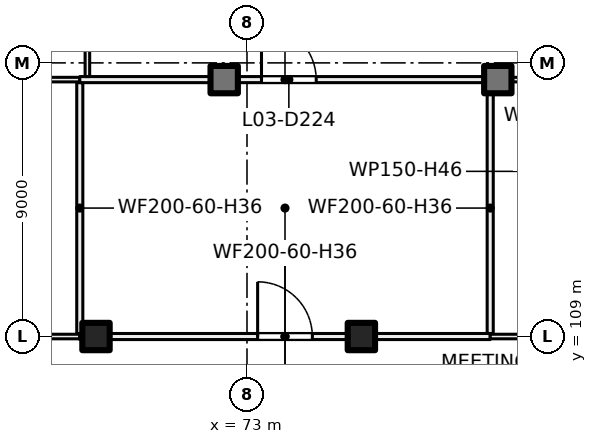
"""IFC4 building model, lengths in metres.
Left out: names, types, materials, properties, quantities, classifications, styles, units other than length and angle.
Written with IfcOpenShell. Run it as: python <this file> out.ifc"""

import sys

from ifc_helpers import new_model, si_unit, direction, frame, frame_2d, origin, origin_2d, place, context, subcontext, project, spatial, rectangle, extrude, element, fill, save


model = new_model("IFC4")
c1 = context("Model", 3, precision=1e-05, world=origin(), true_north=direction((0.0, 1.0)))
c2 = subcontext(c1, "Body", "Model", "MODEL_VIEW")
j1 = project(units=[si_unit("LENGTHUNIT", "METRE"), si_unit("PLANEANGLEUNIT", "RADIAN")], contexts=[c1])
p1 = place(None, origin())
s1 = spatial("IfcSite", under=j1, at=p1, CompositionType="ELEMENT")
p2 = place(p1, origin())
s2 = spatial("IfcBuilding", under=s1, at=p2, CompositionType="ELEMENT")
p3 = place(p2, frame((0.0, 0.0, 17.5)))
s3 = spatial("IfcBuildingStorey", under=s2, at=p3, CompositionType="ELEMENT", Elevation=17.5)
for number, where, z_axis, x_axis in (
    (1, (68.033, 109.0, 0.0), (0.0, 0.0, 1.0), (1.0, 0.0, 0.0)),
    (2, (76.762, 109.0, 0.0), (0.0, 0.0, 1.0), (1.0, 0.0, 0.0)),
    (3, (72.25, 117.45, 0.0), (0.0, 0.0, 1.0), (1.0, 0.0, 0.0)),
    (4, (81.25, 117.45, 0.0), (0.0, 0.0, 1.0), (1.0, 0.0, 0.0)),
):
    element("IfcColumn", number, at=place(p3, frame(where, z_axis=z_axis, x_axis=x_axis)), inside=s3, PredefinedType="COLUMN", context=c2, shape_type="SweptSolid", body=[
        extrude(rectangle(XDim=0.9, YDim=0.9, at=origin_2d()), origin(), (0.0, 0.0, 1.0), 5.0),
    ])
p4 = place(p3, frame((49.825, 117.45, 0.0), z_axis=(0.0, 0.0, 1.0), x_axis=(1.0, 0.0, 0.0)))
e5 = element("IfcWall", 5, at=p4, inside=s3, PredefinedType="PARTITIONING", context=c2, shape_type="SweptSolid", body=[
    extrude(rectangle(XDim=17.675, YDim=0.15, at=frame_2d((8.837, 0.0))), origin(), (0.0, 0.0, 1.0), 4.6),
])
p5 = place(p3, frame((59.384, 109.0, 0.0), z_axis=(0.0, 0.0, 1.0), x_axis=(1.0, 0.0, 0.0)))
e6 = element("IfcWall", 6, at=p5, inside=s3, PredefinedType="PARTITIONING", context=c2, shape_type="SweptSolid", body=[
    extrude(rectangle(XDim=8.116, YDim=0.15, at=frame_2d((4.058, 0.0))), origin(), (0.0, 0.0, 1.0), 3.6),
])
p6 = place(p3, frame((67.5, 109.1, 0.0), z_axis=(0.0, 0.0, 1.0), x_axis=(0.0, 1.0, 0.0)))
e7 = element("IfcWall", 7, at=p6, inside=s3, PredefinedType="PARTITIONING", context=c2, shape_type="SweptSolid", body=[
    extrude(rectangle(XDim=8.25, YDim=0.2, at=frame_2d((4.125, 0.0))), origin(), (0.0, 0.0, 1.0), 3.6),
])
p7 = place(p3, frame((67.5, 109.0, 0.0), z_axis=(0.0, 0.0, 1.0), x_axis=(1.0, 0.0, 0.0)))
e8 = element("IfcWall", 8, at=p7, inside=s3, PredefinedType="PARTITIONING", context=c2, shape_type="SweptSolid", body=[
    extrude(rectangle(XDim=13.5, YDim=0.2, at=frame_2d((6.75, 0.0))), origin(), (0.0, 0.0, 1.0), 3.6),
])
p8 = place(p7, frame((5.85, 0.0, 0.0)))
e9 = element("IfcOpeningElement", 9, at=p8, cuts=e8, PredefinedType="OPENING", context=c2, shape_type="SweptSolid", body=[
    extrude(rectangle(XDim=1.8, YDim=2.1, at=frame_2d((0.9, 1.05))), frame((0.0, 0.11, 0.0), z_axis=(0.0, -1.0, 0.0), x_axis=(1.0, 0.0, 0.0)), (0.0, 0.0, 1.0), 0.22),
])
p9 = place(p3, frame((67.5, 117.45, 0.0), z_axis=(0.0, 0.0, 1.0), x_axis=(1.0, 0.0, 0.0)))
e10 = element("IfcWall", 10, at=p9, inside=s3, PredefinedType="PARTITIONING", context=c2, shape_type="SweptSolid", body=[
    extrude(rectangle(XDim=13.5, YDim=0.2, at=frame_2d((6.75, 0.0))), origin(), (0.0, 0.0, 1.0), 4.6),
])
p10 = place(p9, frame((5.977, 0.0, 0.0)))
e11 = element("IfcOpeningElement", 11, at=p10, cuts=e10, PredefinedType="OPENING", context=c2, shape_type="SweptSolid", body=[
    extrude(rectangle(XDim=1.8, YDim=2.1, at=frame_2d((0.9, 1.05))), frame((0.0, 0.11, 0.0), z_axis=(0.0, -1.0, 0.0), x_axis=(1.0, 0.0, 0.0)), (0.0, 0.0, 1.0), 0.22),
])
p11 = place(p3, frame((67.75, 117.55, 0.0), z_axis=(0.0, 0.0, 1.0), x_axis=(0.0, 1.0, 0.0)))
e12 = element("IfcWall", 12, at=p11, inside=s3, PredefinedType="PARTITIONING", context=c2, shape_type="SweptSolid", body=[
    extrude(rectangle(XDim=8.45, YDim=0.15, at=frame_2d((4.225, 0.0))), origin(), (0.0, 0.0, 1.0), 4.6),
])
p12 = place(p3, frame((81.0, 109.1, 0.0), z_axis=(0.0, 0.0, 1.0), x_axis=(0.0, 1.0, 0.0)))
e13 = element("IfcWall", 13, at=p12, inside=s3, PredefinedType="PARTITIONING", context=c2, shape_type="SweptSolid", body=[
    extrude(rectangle(XDim=8.25, YDim=0.2, at=frame_2d((4.125, 0.0))), origin(), (0.0, 0.0, 1.0), 3.6),
])
p13 = place(p3, frame((81.0, 109.0, 0.0), z_axis=(0.0, 0.0, 1.0), x_axis=(1.0, 0.0, 0.0)))
e14 = element("IfcWall", 14, at=p13, inside=s3, PredefinedType="PARTITIONING", context=c2, shape_type="SweptSolid", body=[
    extrude(rectangle(XDim=24.5, YDim=0.15, at=frame_2d((12.25, 0.0))), origin(), (0.0, 0.0, 1.0), 3.6),
])
p14 = place(p3, frame((81.0, 117.45, 0.0), z_axis=(0.0, 0.0, 1.0), x_axis=(1.0, 0.0, 0.0)))
e15 = element("IfcWall", 15, at=p14, inside=s3, PredefinedType="PARTITIONING", context=c2, shape_type="SweptSolid", body=[
    extrude(rectangle(XDim=10.0, YDim=0.15, at=frame_2d((5.0, 0.0))), origin(), (0.0, 0.0, 1.0), 4.6),
])
p15 = place(p8, origin())
e16 = element("IfcDoor", 16, at=p15, inside=s3, OperationType="DOUBLE_DOOR_SINGLE_SWING", PredefinedType="DOOR", context=c2, shape_type="SweptSolid", body=[
    extrude(rectangle(XDim=1.8, YDim=2.1, at=frame_2d((0.9, 1.05))), frame((0.0, 0.025, 0.0), z_axis=(0.0, -1.0, 0.0), x_axis=(1.0, 0.0, 0.0)), (0.0, 0.0, 1.0), 0.05),
])
fill(e9, e16)
p16 = place(p10, origin())
e17 = element("IfcDoor", 17, at=p16, inside=s3, OperationType="DOUBLE_DOOR_SINGLE_SWING", PredefinedType="DOOR", context=c2, shape_type="SweptSolid", body=[
    extrude(rectangle(XDim=1.8, YDim=2.1, at=frame_2d((0.9, 1.05))), frame((0.0, 0.025, 0.0), z_axis=(0.0, -1.0, 0.0), x_axis=(1.0, 0.0, 0.0)), (0.0, 0.0, 1.0), 0.05),
])
fill(e11, e17)
save(model, sys.argv[1])
